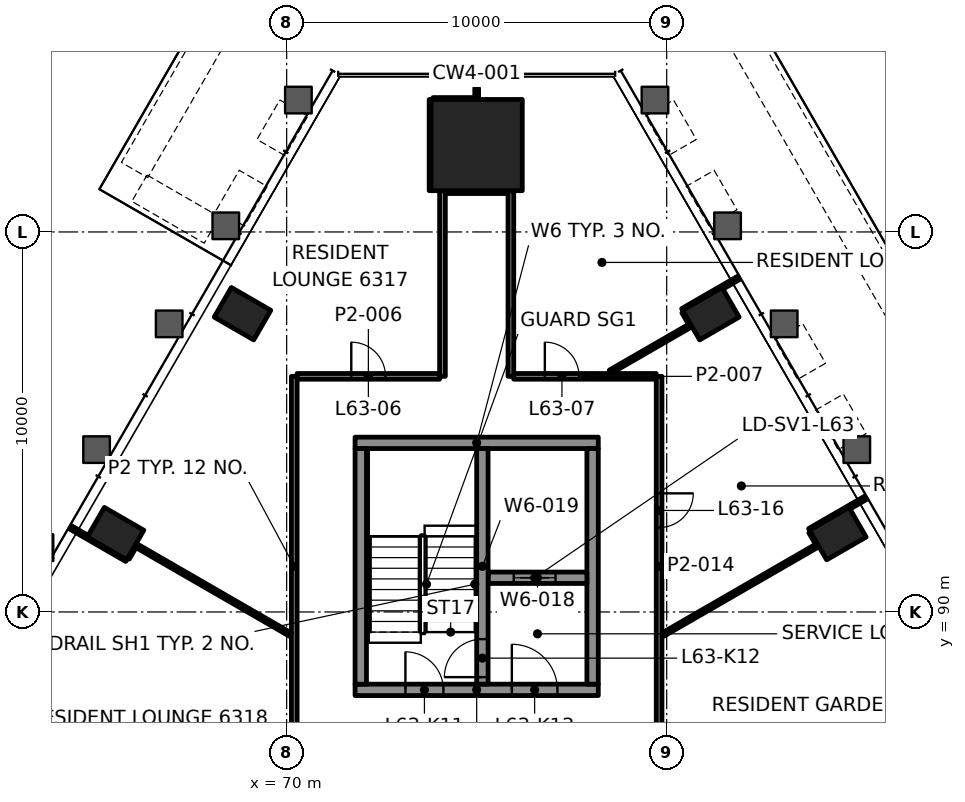
"""IFC4 building model, lengths in metres.
Left out: names, types, materials, properties, quantities, classifications, styles, units other than length and angle.
Written with IfcOpenShell. Run it as: python <this file> out.ifc"""

import sys

from ifc_helpers import new_model, si_unit, direction, frame, frame_2d, origin, origin_2d, place, context, subcontext, project, spatial, rectangle, hollow_rectangle, extrude, element, fill, save


model = new_model("IFC4")
c1 = context("Model", 3, precision=1e-05, world=origin(), true_north=direction((0.0, 1.0)))
c2 = subcontext(c1, "Body", "Model", "MODEL_VIEW")
j1 = project(units=[si_unit("LENGTHUNIT", "METRE"), si_unit("PLANEANGLEUNIT", "RADIAN")], contexts=[c1])
p1 = place(None, origin())
s1 = spatial("IfcSite", under=j1, at=p1, CompositionType="ELEMENT")
p2 = place(p1, origin())
s2 = spatial("IfcBuilding", under=s1, at=p2, CompositionType="ELEMENT")
p3 = place(p2, frame((0.0, 0.0, 267.1)))
s3 = spatial("IfcBuildingStorey", under=s2, at=p3, CompositionType="ELEMENT", Elevation=267.1)
p4 = place(p3, frame((75.0, 102.286, 0.0), z_axis=(0.0, 0.0, 1.0), x_axis=(-1.0, 0.0, 0.0)))
e1 = element("IfcColumn", 1, at=p4, inside=s3, PredefinedType="COLUMN", context=c2, shape_type="SweptSolid", body=[
    extrude(rectangle(XDim=2.4, YDim=2.4, at=origin_2d()), origin(), (0.0, 0.0, 1.0), 3.5),
])
for number, where, z_axis, x_axis in (
    (2, (84.503, 92.062, -0.0), (0.0, 0.0, 1.0), (-0.5, 0.866, 0.0)),
    (3, (81.162, 97.849, -0.0), (0.0, 0.0, 1.0), (-0.5, 0.866, 0.0)),
    (4, (68.838, 97.849, -0.0), (0.0, 0.0, 1.0), (-0.5, -0.866, 0.0)),
    (5, (65.497, 92.062, -0.0), (0.0, 0.0, 1.0), (-0.5, -0.866, 0.0)),
):
    element("IfcColumn", number, at=place(p3, frame(where, z_axis=z_axis, x_axis=x_axis)), inside=s3, PredefinedType="COLUMN", context=c2, shape_type="SweptSolid", body=[
        extrude(hollow_rectangle(XDim=0.9, YDim=1.2, WallThickness=0.06, at=origin_2d()), origin(), (0.0, 0.0, 1.0), 3.5),
    ])
p5 = place(p3, frame((71.8, 87.95, 0.0), z_axis=(0.0, 0.0, 1.0), x_axis=(1.0, 0.0, 0.0)))
e6 = element("IfcWall", 6, at=p5, inside=s3, PredefinedType="SHEAR", context=c2, shape_type="SweptSolid", body=[
    extrude(rectangle(XDim=6.4, YDim=0.3, at=frame_2d((3.2, 0.0))), origin(), (0.0, 0.0, 1.0), 3.3),
])
p6 = place(p5, frame((1.325, 0.0, 0.0)))
e7 = element("IfcOpeningElement", 7, at=p6, cuts=e6, PredefinedType="OPENING", context=c2, shape_type="SweptSolid", body=[
    extrude(rectangle(XDim=1.0, YDim=2.1, at=frame_2d((0.5, 1.05))), frame((0.0, 0.16, 0.0), z_axis=(0.0, -1.0, 0.0), x_axis=(1.0, 0.0, 0.0)), (0.0, 0.0, 1.0), 0.32),
])
p7 = place(p5, frame((4.125, 0.0, 0.0)))
e8 = element("IfcOpeningElement", 8, at=p7, cuts=e6, PredefinedType="OPENING", context=c2, shape_type="SweptSolid", body=[
    extrude(rectangle(XDim=1.2, YDim=2.1, at=frame_2d((0.6, 1.05))), frame((0.0, 0.16, 0.0), z_axis=(0.0, -1.0, 0.0), x_axis=(1.0, 0.0, 0.0)), (0.0, 0.0, 1.0), 0.32),
])
p8 = place(p3, frame((71.8, 94.45, 0.0), z_axis=(0.0, 0.0, 1.0), x_axis=(1.0, 0.0, 0.0)))
e9 = element("IfcWall", 9, at=p8, inside=s3, PredefinedType="SHEAR", context=c2, shape_type="SweptSolid", body=[
    extrude(rectangle(XDim=6.4, YDim=0.3, at=frame_2d((3.2, 0.0))), origin(), (0.0, 0.0, 1.0), 3.3),
])
for number, where, z_axis, x_axis in (
    (10, (71.95, 88.1, 0.0), (0.0, 0.0, 1.0), (0.0, 1.0, 0.0)),
    (11, (78.05, 88.1, 0.0), (0.0, 0.0, 1.0), (0.0, 1.0, 0.0)),
):
    element("IfcWall", number, at=place(p3, frame(where, z_axis=z_axis, x_axis=x_axis)), inside=s3, PredefinedType="SHEAR", context=c2, shape_type="SweptSolid", body=[
        extrude(rectangle(XDim=6.2, YDim=0.3, at=frame_2d((3.1, 0.0))), origin(), (0.0, 0.0, 1.0), 3.3),
    ])
p9 = place(p3, frame((75.3, 90.9, 0.0), z_axis=(0.0, 0.0, 1.0), x_axis=(1.0, 0.0, 0.0)))
e12 = element("IfcWall", 12, at=p9, inside=s3, PredefinedType="SHEAR", context=c2, shape_type="SweptSolid", body=[
    extrude(rectangle(XDim=2.6, YDim=0.3, at=frame_2d((1.3, 0.0))), origin(), (0.0, 0.0, 1.0), 3.3),
])
p10 = place(p9, frame((0.675, 0.0, 0.0)))
e13 = element("IfcOpeningElement", 13, at=p10, cuts=e12, PredefinedType="OPENING", context=c2, shape_type="SweptSolid", body=[
    extrude(rectangle(XDim=1.1, YDim=2.1, at=frame_2d((0.55, 1.05))), frame((0.0, 0.16, 0.0), z_axis=(0.0, -1.0, 0.0), x_axis=(1.0, 0.0, 0.0)), (0.0, 0.0, 1.0), 0.32),
])
p11 = place(p3, frame((75.15, 88.1, 0.0), z_axis=(0.0, 0.0, 1.0), x_axis=(0.0, 1.0, 0.0)))
e14 = element("IfcWall", 14, at=p11, inside=s3, PredefinedType="SHEAR", context=c2, shape_type="SweptSolid", body=[
    extrude(rectangle(XDim=6.2, YDim=0.3, at=frame_2d((3.1, 0.0))), origin(), (0.0, 0.0, 1.0), 3.3),
])
p12 = place(p11, frame((0.185, 0.0, 0.0)))
e15 = element("IfcOpeningElement", 15, at=p12, cuts=e14, PredefinedType="OPENING", context=c2, shape_type="SweptSolid", body=[
    extrude(rectangle(XDim=1.0, YDim=2.1, at=frame_2d((0.5, 1.05))), frame((0.0, 0.16, 0.0), z_axis=(0.0, -1.0, 0.0), x_axis=(1.0, 0.0, 0.0)), (0.0, 0.0, 1.0), 0.32),
])
p13 = place(p3, frame((70.275, 96.2, 0.0), z_axis=(0.0, 0.0, 1.0), x_axis=(1.0, 0.0, 0.0)))
e16 = element("IfcWall", 16, at=p13, inside=s3, PredefinedType="PARTITIONING", context=c2, shape_type="SweptSolid", body=[
    extrude(rectangle(XDim=3.75, YDim=0.15, at=frame_2d((1.875, 0.0))), origin(), (0.0, 0.0, 1.0), 2.7),
])
p14 = place(p13, frame((1.425, 0.0, 0.0)))
e17 = element("IfcOpeningElement", 17, at=p14, cuts=e16, PredefinedType="OPENING", context=c2, shape_type="SweptSolid", body=[
    extrude(rectangle(XDim=0.9, YDim=2.1, at=frame_2d((0.45, 1.05))), frame((0.0, 0.085, 0.0), z_axis=(0.0, -1.0, 0.0), x_axis=(1.0, 0.0, 0.0)), (0.0, 0.0, 1.0), 0.17),
])
p15 = place(p3, frame((75.975, 96.2, 0.0), z_axis=(0.0, 0.0, 1.0), x_axis=(1.0, 0.0, 0.0)))
e18 = element("IfcWall", 18, at=p15, inside=s3, PredefinedType="PARTITIONING", context=c2, shape_type="SweptSolid", body=[
    extrude(rectangle(XDim=3.75, YDim=0.15, at=frame_2d((1.875, 0.0))), origin(), (0.0, 0.0, 1.0), 2.7),
])
p16 = place(p15, frame((0.819, 0.0, 0.0)))
e19 = element("IfcOpeningElement", 19, at=p16, cuts=e18, PredefinedType="OPENING", context=c2, shape_type="SweptSolid", body=[
    extrude(rectangle(XDim=0.9, YDim=2.1, at=frame_2d((0.45, 1.05))), frame((0.0, 0.085, 0.0), z_axis=(0.0, -1.0, 0.0), x_axis=(1.0, 0.0, 0.0)), (0.0, 0.0, 1.0), 0.17),
])
p17 = place(p3, frame((74.18, 101.086, 0.0), z_axis=(0.0, 0.0, 1.0), x_axis=(1.0, 0.0, 0.0)))
e20 = element("IfcWall", 20, at=p17, inside=s3, PredefinedType="PARTITIONING", context=c2, shape_type="SweptSolid", body=[
    extrude(rectangle(XDim=1.644, YDim=0.15, at=frame_2d((0.822, 0.0))), origin(), (0.0, 0.0, 1.0), 2.697),
])
p18 = place(p3, frame((73.851, 103.486, 0.0), z_axis=(0.0, 0.0, 1.0), x_axis=(1.0, 0.0, 0.0)))
e21 = element("IfcWall", 21, at=p18, inside=s3, PredefinedType="PARTITIONING", context=c2, shape_type="SweptSolid", body=[
    extrude(rectangle(XDim=1.149, YDim=0.1, at=frame_2d((0.575, 0.0))), origin(), (0.0, 0.0, 1.0), 2.7),
])
p19 = place(p3, frame((79.901, 89.404, 0.0), z_axis=(0.0, 0.0, 1.0), x_axis=(0.866026044032, 0.499998891056, 0.0)))
e22 = element("IfcWall", 22, at=p19, inside=s3, PredefinedType="PARTITIONING", context=c2, shape_type="SweptSolid", body=[
    extrude(rectangle(XDim=4.714, YDim=0.1, at=frame_2d((2.357, 0.0))), origin(), (0.0, 0.0, 1.0), 2.7),
])
p20 = place(p3, frame((83.759, 92.151, 0.0), z_axis=(0.0, 0.0, 1.0), x_axis=(0.865979829179, 0.500078929226, 0.0)))
e23 = element("IfcWall", 23, at=p20, inside=s3, PredefinedType="PARTITIONING", context=c2, shape_type="SweptSolid", body=[
    extrude(rectangle(XDim=1.699, YDim=0.1, at=frame_2d((0.85, 0.0))), origin(), (0.0, 0.0, 1.0), 2.7),
])
p21 = place(p3, frame((78.514, 96.32, 0.0), z_axis=(0.0, 0.0, 1.0), x_axis=(0.866040013382, 0.499974694581, 0.0)))
e24 = element("IfcWall", 24, at=p21, inside=s3, PredefinedType="PARTITIONING", context=c2, shape_type="SweptSolid", body=[
    extrude(rectangle(XDim=2.458, YDim=0.1, at=frame_2d((1.229, 0.0))), origin(), (0.0, 0.0, 1.0), 2.7),
])
p22 = place(p3, frame((80.417, 97.939, 0.0), z_axis=(0.0, 0.0, 1.0), x_axis=(0.866077946534, 0.499908982242, 0.0)))
e25 = element("IfcWall", 25, at=p22, inside=s3, PredefinedType="PARTITIONING", context=c2, shape_type="SweptSolid", body=[
    extrude(rectangle(XDim=1.699, YDim=0.1, at=frame_2d((0.85, 0.0))), origin(), (0.0, 0.0, 1.0), 2.7),
])
p23 = place(p3, frame((65.817, 91.417, 0.0), z_axis=(0.0, 0.0, 1.0), x_axis=(0.499985493453, 0.866033778982, 0.0)))
e26 = element("IfcWall", 26, at=p23, inside=s3, PredefinedType="PARTITIONING", context=c2, shape_type="SweptSolid", body=[
    extrude(rectangle(XDim=0.348, YDim=0.1, at=frame_2d((0.174, 0.0))), origin(), (0.0, 0.0, 1.0), 2.7),
])
p24 = place(p3, frame((79.8, 96.199, 0.0), z_axis=(0.0, 0.0, 1.0), x_axis=(0.0, -1.0, 0.0)))
e27 = element("IfcWall", 27, at=p24, inside=s3, PredefinedType="PARTITIONING", context=c2, shape_type="SweptSolid", body=[
    extrude(rectangle(XDim=9.999, YDim=0.15, at=frame_2d((5.0, 0.0))), origin(), (0.0, 0.0, 1.0), 2.7),
])
p25 = place(p24, frame((3.078, 0.0, 0.0)))
e28 = element("IfcOpeningElement", 28, at=p25, cuts=e27, PredefinedType="OPENING", context=c2, shape_type="SweptSolid", body=[
    extrude(rectangle(XDim=0.9, YDim=2.1, at=frame_2d((0.45, 1.05))), frame((0.0, 0.085, 0.0), z_axis=(0.0, -1.0, 0.0), x_axis=(1.0, 0.0, 0.0)), (0.0, 0.0, 1.0), 0.17),
])
p26 = place(p3, frame((75.9, 96.2, 0.0), z_axis=(0.0, 0.0, 1.0), x_axis=(0.0, 1.0, 0.0)))
e29 = element("IfcWall", 29, at=p26, inside=s3, PredefinedType="PARTITIONING", context=c2, shape_type="SweptSolid", body=[
    extrude(rectangle(XDim=4.886, YDim=0.15, at=frame_2d((2.443, 0.0))), origin(), (0.0, 0.0, 1.0), 2.7),
])
p27 = place(p3, frame((75.0, 103.536, 0.0), z_axis=(0.0, 0.0, 1.0), x_axis=(0.0, 1.0, 0.0)))
e30 = element("IfcWall", 30, at=p27, inside=s3, PredefinedType="PARTITIONING", context=c2, shape_type="SweptSolid", body=[
    extrude(rectangle(XDim=0.25, YDim=0.1, at=frame_2d((0.125, 0.0))), origin(), (0.0, 0.0, 1.0), 2.7),
])
p28 = place(p3, frame((74.1, 96.2, 0.0), z_axis=(0.0, 0.0, 1.0), x_axis=(0.0, 1.0, 0.0)))
e31 = element("IfcWall", 31, at=p28, inside=s3, PredefinedType="PARTITIONING", context=c2, shape_type="SweptSolid", body=[
    extrude(rectangle(XDim=4.886, YDim=0.15, at=frame_2d((2.443, 0.0))), origin(), (0.0, 0.0, 1.0), 2.7),
])
p29 = place(p3, frame((73.8, 101.087, 0.0), z_axis=(0.0, 0.0, 1.0), x_axis=(0.0, 1.0, 0.0)))
e32 = element("IfcWall", 32, at=p29, inside=s3, PredefinedType="PARTITIONING", context=c2, shape_type="SweptSolid", body=[
    extrude(rectangle(XDim=2.399, YDim=0.1, at=frame_2d((1.199, 0.0))), origin(), (0.0, 0.0, 1.0), 2.7),
])
p30 = place(p3, frame((70.2, 86.202, 0.0), z_axis=(0.0, 0.0, 1.0), x_axis=(0.0, 1.0, 0.0)))
e33 = element("IfcWall", 33, at=p30, inside=s3, PredefinedType="PARTITIONING", context=c2, shape_type="SweptSolid", body=[
    extrude(rectangle(XDim=9.998, YDim=0.15, at=frame_2d((4.999, 0.0))), origin(), (0.0, 0.0, 1.0), 2.7),
])
for number, where, z_axis, x_axis in (
    (34, (83.954, 91.813, 0.0), (0.0, 0.0, 1.0), (-0.5, 0.866, 0.0)),
    (35, (80.613, 97.601, 0.0), (0.0, 0.0, 1.0), (-0.5, 0.866, 0.0)),
):
    element("IfcWall", number, at=place(p3, frame(where, z_axis=z_axis, x_axis=x_axis)), inside=s3, PredefinedType="PARTITIONING", context=c2, shape_type="SweptSolid", body=[
        extrude(rectangle(XDim=0.34, YDim=0.1, at=frame_2d((0.17, 0.0))), origin(), (0.0, 0.0, 1.0), 2.7),
    ])
p31 = place(p3, frame((70.099, 89.404, 0.0), z_axis=(0.0, 0.0, 1.0), x_axis=(-0.866026044032, 0.499998891056, 0.0)))
e36 = element("IfcWall", 36, at=p31, inside=s3, PredefinedType="PARTITIONING", context=c2, shape_type="SweptSolid", body=[
    extrude(rectangle(XDim=4.714, YDim=0.1, at=frame_2d((2.357, 0.0))), origin(), (0.0, 0.0, 1.0), 2.7),
])
p32 = place(p3, frame((65.79, 91.373, 0.0), z_axis=(0.0, 0.0, 1.0), x_axis=(-0.866085039529, 0.499896693632, 0.0)))
e37 = element("IfcWall", 37, at=p32, inside=s3, PredefinedType="PARTITIONING", context=c2, shape_type="SweptSolid", body=[
    extrude(rectangle(XDim=1.698, YDim=0.1, at=frame_2d((0.849, 0.0))), origin(), (0.0, 0.0, 1.0), 2.688),
])
p33 = place(p3, frame((105.682, 64.079, 0.0), z_axis=(0.0, 0.0, 1.0), x_axis=(-0.500001689899, 0.866024428119, 0.0)))
e38 = element("IfcWall", 38, at=p33, inside=s3, PredefinedType="SOLIDWALL", context=c2, shape_type="SweptSolid", body=[
    extrude(rectangle(XDim=49.597, YDim=0.8, at=frame_2d((24.799, 0.0))), origin(), (0.0, 0.0, 1.0), 0.9),
])
p34 = place(p3, frame((69.117, 107.032, 0.0), z_axis=(0.0, 0.0, 1.0), x_axis=(-0.499982189669, -0.86603568634, 0.0)))
e39 = element("IfcWall", 39, at=p34, inside=s3, PredefinedType="SOLIDWALL", context=c2, shape_type="SweptSolid", body=[
    extrude(rectangle(XDim=6.238, YDim=0.8, at=frame_2d((3.119, 0.0))), origin(), (0.0, 0.0, 1.0), 0.9),
])
p35 = place(p3, frame((66.126, 101.151, 0.0), z_axis=(0.0, 0.0, 1.0), x_axis=(0.866008176907, -0.50002983664, 0.0)))
e40 = element("IfcWall", 40, at=p35, inside=s3, PredefinedType="SOLIDWALL", context=c2, shape_type="SweptSolid", body=[
    extrude(rectangle(XDim=2.2, YDim=0.8, at=frame_2d((1.1, 0.0))), origin(), (0.0, 0.0, 1.0), 0.9),
])
p36 = place(p14, origin())
e41 = element("IfcDoor", 41, at=p36, inside=s3, OperationType="SINGLE_SWING_RIGHT", PredefinedType="DOOR", context=c2, shape_type="SweptSolid", body=[
    extrude(rectangle(XDim=0.9, YDim=2.1, at=frame_2d((0.45, 1.05))), frame((0.0, 0.025, 0.0), z_axis=(0.0, -1.0, 0.0), x_axis=(1.0, 0.0, 0.0)), (0.0, 0.0, 1.0), 0.05),
])
fill(e17, e41)
p37 = place(p16, origin())
e42 = element("IfcDoor", 42, at=p37, inside=s3, OperationType="SINGLE_SWING_LEFT", PredefinedType="DOOR", context=c2, shape_type="SweptSolid", body=[
    extrude(rectangle(XDim=0.9, YDim=2.1, at=frame_2d((0.45, 1.05))), frame((0.0, 0.025, 0.0), z_axis=(0.0, -1.0, 0.0), x_axis=(1.0, 0.0, 0.0)), (0.0, 0.0, 1.0), 0.05),
])
fill(e19, e42)
p38 = place(p25, origin())
e43 = element("IfcDoor", 43, at=p38, inside=s3, OperationType="SINGLE_SWING_LEFT", PredefinedType="DOOR", context=c2, shape_type="SweptSolid", body=[
    extrude(rectangle(XDim=0.9, YDim=2.1, at=frame_2d((0.45, 1.05))), frame((0.0, 0.025, 0.0), z_axis=(0.0, -1.0, 0.0), x_axis=(1.0, 0.0, 0.0)), (0.0, 0.0, 1.0), 0.05),
])
fill(e28, e43)
p39 = place(p10, origin())
e44 = element("IfcDoor", 44, at=p39, inside=s3, OperationType="DOUBLE_DOOR_SLIDING", PredefinedType="DOOR", context=c2, shape_type="SweptSolid", body=[
    extrude(rectangle(XDim=1.1, YDim=2.1, at=frame_2d((0.55, 1.05))), frame((0.0, 0.025, 0.0), z_axis=(0.0, -1.0, 0.0), x_axis=(1.0, 0.0, 0.0)), (0.0, 0.0, 1.0), 0.05),
])
fill(e13, e44)
p40 = place(p6, origin())
e45 = element("IfcDoor", 45, at=p40, inside=s3, OperationType="SINGLE_SWING_RIGHT", PredefinedType="DOOR", context=c2, shape_type="SweptSolid", body=[
    extrude(rectangle(XDim=1.0, YDim=2.1, at=frame_2d((0.5, 1.05))), frame((0.0, 0.025, 0.0), z_axis=(0.0, -1.0, 0.0), x_axis=(1.0, 0.0, 0.0)), (0.0, 0.0, 1.0), 0.05),
])
fill(e7, e45)
p41 = place(p12, origin())
e46 = element("IfcDoor", 46, at=p41, inside=s3, OperationType="SINGLE_SWING_LEFT", PredefinedType="DOOR", context=c2, shape_type="SweptSolid", body=[
    extrude(rectangle(XDim=1.0, YDim=2.1, at=frame_2d((0.5, 1.05))), frame((0.0, 0.025, 0.0), z_axis=(0.0, -1.0, 0.0), x_axis=(1.0, 0.0, 0.0)), (0.0, 0.0, 1.0), 0.05),
])
fill(e15, e46)
p42 = place(p7, origin())
e47 = element("IfcDoor", 47, at=p42, inside=s3, OperationType="SINGLE_SWING_RIGHT", PredefinedType="DOOR", context=c2, shape_type="SweptSolid", body=[
    extrude(rectangle(XDim=1.2, YDim=2.1, at=frame_2d((0.6, 1.05))), frame((0.0, 0.025, 0.0), z_axis=(0.0, -1.0, 0.0), x_axis=(1.0, 0.0, 0.0)), (0.0, 0.0, 1.0), 0.05),
])
fill(e8, e47)
save(model, sys.argv[1])
